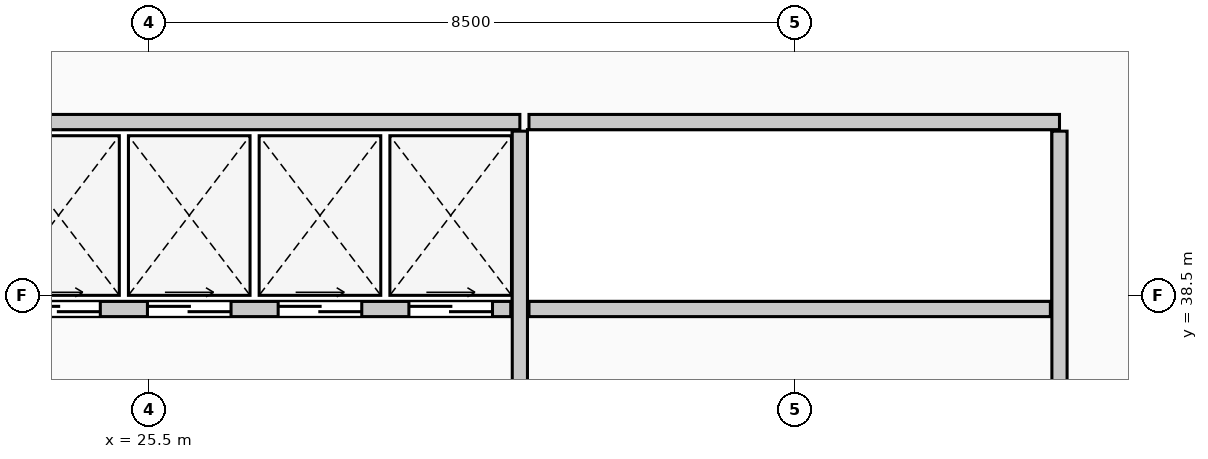
"""IFC4 building model, lengths in metres.
Left out: names, types, materials, properties, quantities, classifications, styles, units other than length and angle.
Written with IfcOpenShell. Run it as: python <this file> out.ifc"""

import sys

from ifc_helpers import new_model, si_unit, direction, frame, frame_2d, origin, place, context, subcontext, project, spatial, rectangle, extrude, element, fill, save


model = new_model("IFC4")
c1 = context("Model", 3, precision=1e-05, world=origin(), true_north=direction((0.0, 1.0)))
c2 = subcontext(c1, "Body", "Model", "MODEL_VIEW")
j1 = project(units=[si_unit("LENGTHUNIT", "METRE"), si_unit("PLANEANGLEUNIT", "RADIAN")], contexts=[c1])
p1 = place(None, origin())
s1 = spatial("IfcSite", under=j1, at=p1, CompositionType="ELEMENT")
p2 = place(p1, origin())
s2 = spatial("IfcBuilding", under=s1, at=p2, CompositionType="ELEMENT")
p3 = place(p2, frame((0.0, 0.0, 31.4)))
s3 = spatial("IfcBuildingStorey", under=s2, at=p3, CompositionType="ELEMENT", Elevation=31.4)
p4 = place(p3, frame((23.47, 40.78, 0.0), z_axis=(0.0, 0.0, 1.0), x_axis=(1.0, 0.0, 0.0)))
e1 = element("IfcWall", 1, at=p4, inside=s3, PredefinedType="PARTITIONING", context=c2, shape_type="SweptSolid", body=[
    extrude(rectangle(XDim=6.91, YDim=0.2, at=frame_2d((3.455, 0.0))), origin(), (0.0, 0.0, 1.0), 4.1),
])
p5 = place(p3, frame((30.38, 33.02, 0.0), z_axis=(0.0, 0.0, 1.0), x_axis=(0.0, 1.0, 0.0)))
e2 = element("IfcWall", 2, at=p5, inside=s3, PredefinedType="PARTITIONING", context=c2, shape_type="SweptSolid", body=[
    extrude(rectangle(XDim=7.64, YDim=0.2, at=frame_2d((3.82, 0.0))), origin(), (0.0, 0.0, 1.0), 4.1),
])
p6 = place(p3, frame((23.47, 38.32, 0.0), z_axis=(0.0, 0.0, 1.0), x_axis=(1.0, 0.0, 0.0)))
e3 = element("IfcWall", 3, at=p6, inside=s3, PredefinedType="PARTITIONING", context=c2, shape_type="SweptSolid", body=[
    extrude(rectangle(XDim=6.79, YDim=0.2, at=frame_2d((3.395, 0.0))), origin(), (0.0, 0.0, 1.0), 4.1),
])
p7 = place(p6, frame((0.29, 0.0, 0.0)))
e4 = element("IfcOpeningElement", 4, at=p7, cuts=e3, PredefinedType="OPENING", context=c2, shape_type="SweptSolid", body=[
    extrude(rectangle(XDim=1.1, YDim=2.2, at=frame_2d((0.55, 1.1))), frame((0.0, 0.11, 0.0), z_axis=(0.0, -1.0, 0.0), x_axis=(1.0, 0.0, 0.0)), (0.0, 0.0, 1.0), 0.22),
])
p8 = place(p6, frame((2.01, 0.0, 0.0)))
e5 = element("IfcOpeningElement", 5, at=p8, cuts=e3, PredefinedType="OPENING", context=c2, shape_type="SweptSolid", body=[
    extrude(rectangle(XDim=1.1, YDim=2.2, at=frame_2d((0.55, 1.1))), frame((0.0, 0.11, 0.0), z_axis=(0.0, -1.0, 0.0), x_axis=(1.0, 0.0, 0.0)), (0.0, 0.0, 1.0), 0.22),
])
p9 = place(p6, frame((3.73, 0.0, 0.0)))
e6 = element("IfcOpeningElement", 6, at=p9, cuts=e3, PredefinedType="OPENING", context=c2, shape_type="SweptSolid", body=[
    extrude(rectangle(XDim=1.1, YDim=2.2, at=frame_2d((0.55, 1.1))), frame((0.0, 0.11, 0.0), z_axis=(0.0, -1.0, 0.0), x_axis=(1.0, 0.0, 0.0)), (0.0, 0.0, 1.0), 0.22),
])
p10 = place(p6, frame((5.45, 0.0, 0.0)))
e7 = element("IfcOpeningElement", 7, at=p10, cuts=e3, PredefinedType="OPENING", context=c2, shape_type="SweptSolid", body=[
    extrude(rectangle(XDim=1.1, YDim=2.2, at=frame_2d((0.55, 1.1))), frame((0.0, 0.11, 0.0), z_axis=(0.0, -1.0, 0.0), x_axis=(1.0, 0.0, 0.0)), (0.0, 0.0, 1.0), 0.22),
])
p11 = place(p3, frame((30.5, 40.78, 0.0), z_axis=(0.0, 0.0, 1.0), x_axis=(1.0, 0.0, 0.0)))
e8 = element("IfcWall", 8, at=p11, inside=s3, PredefinedType="PARTITIONING", context=c2, shape_type="SweptSolid", body=[
    extrude(rectangle(XDim=6.98, YDim=0.2, at=frame_2d((3.49, 0.0))), origin(), (0.0, 0.0, 1.0), 4.1),
])
p12 = place(p3, frame((37.48, 33.24, 0.0), z_axis=(0.0, 0.0, 1.0), x_axis=(0.0, 1.0, 0.0)))
e9 = element("IfcWall", 9, at=p12, inside=s3, PredefinedType="PARTITIONING", context=c2, shape_type="SweptSolid", body=[
    extrude(rectangle(XDim=7.42, YDim=0.2, at=frame_2d((3.71, 0.0))), origin(), (0.0, 0.0, 1.0), 4.1),
])
p13 = place(p3, frame((30.5, 38.32, 0.0), z_axis=(0.0, 0.0, 1.0), x_axis=(1.0, 0.0, 0.0)))
e10 = element("IfcWall", 10, at=p13, inside=s3, PredefinedType="PARTITIONING", context=c2, shape_type="SweptSolid", body=[
    extrude(rectangle(XDim=6.86, YDim=0.2, at=frame_2d((3.43, 0.0))), origin(), (0.0, 0.0, 1.0), 4.1),
])
p14 = place(p7, origin())
e11 = element("IfcDoor", 11, at=p14, inside=s3, OperationType="DOUBLE_DOOR_SLIDING", PredefinedType="DOOR", context=c2, shape_type="SweptSolid", body=[
    extrude(rectangle(XDim=1.1, YDim=2.2, at=frame_2d((0.55, 1.1))), frame((0.0, 0.025, 0.0), z_axis=(0.0, -1.0, 0.0), x_axis=(1.0, 0.0, 0.0)), (0.0, 0.0, 1.0), 0.05),
])
fill(e4, e11)
p15 = place(p8, origin())
e12 = element("IfcDoor", 12, at=p15, inside=s3, OperationType="DOUBLE_DOOR_SLIDING", PredefinedType="DOOR", context=c2, shape_type="SweptSolid", body=[
    extrude(rectangle(XDim=1.1, YDim=2.2, at=frame_2d((0.55, 1.1))), frame((0.0, 0.025, 0.0), z_axis=(0.0, -1.0, 0.0), x_axis=(1.0, 0.0, 0.0)), (0.0, 0.0, 1.0), 0.05),
])
fill(e5, e12)
p16 = place(p9, origin())
e13 = element("IfcDoor", 13, at=p16, inside=s3, OperationType="DOUBLE_DOOR_SLIDING", PredefinedType="DOOR", context=c2, shape_type="SweptSolid", body=[
    extrude(rectangle(XDim=1.1, YDim=2.2, at=frame_2d((0.55, 1.1))), frame((0.0, 0.025, 0.0), z_axis=(0.0, -1.0, 0.0), x_axis=(1.0, 0.0, 0.0)), (0.0, 0.0, 1.0), 0.05),
])
fill(e6, e13)
p17 = place(p10, origin())
e14 = element("IfcDoor", 14, at=p17, inside=s3, OperationType="DOUBLE_DOOR_SLIDING", PredefinedType="DOOR", context=c2, shape_type="SweptSolid", body=[
    extrude(rectangle(XDim=1.1, YDim=2.2, at=frame_2d((0.55, 1.1))), frame((0.0, 0.025, 0.0), z_axis=(0.0, -1.0, 0.0), x_axis=(1.0, 0.0, 0.0)), (0.0, 0.0, 1.0), 0.05),
])
fill(e7, e14)
save(model, sys.argv[1])
